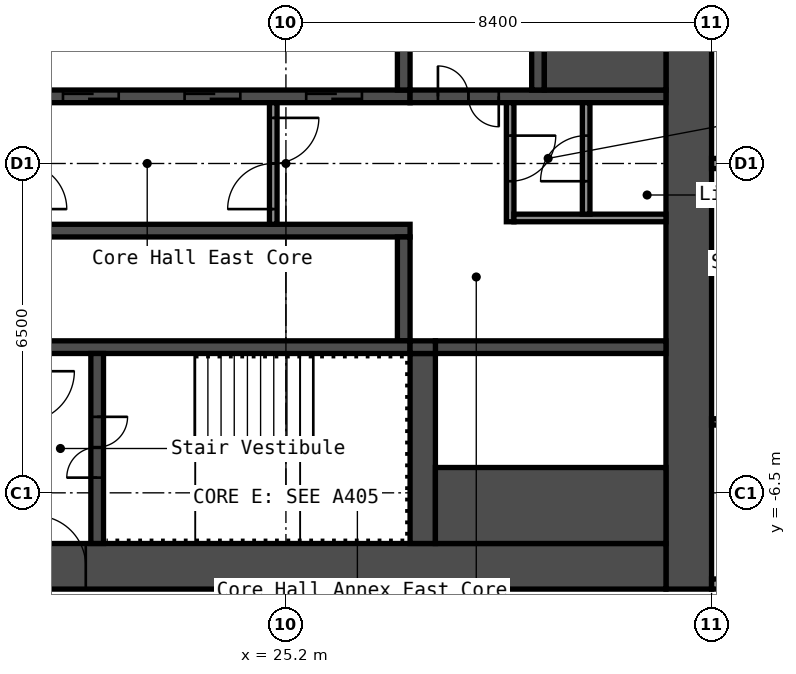
"""IFC4 building model, lengths in metres.
Left out: names, types, materials, properties, quantities, classifications, styles, units other than length and angle.
Written with IfcOpenShell. Run it as: python <this file> out.ifc"""

import sys

from ifc_helpers import new_model, si_unit, direction, frame, frame_2d, origin, place, context, subcontext, project, spatial, rectangle, extrude, element, fill, save


model = new_model("IFC4")
c1 = context("Model", 3, precision=1e-05, world=origin(), true_north=direction((0.0, 1.0)))
c2 = subcontext(c1, "Body", "Model", "MODEL_VIEW")
j1 = project(units=[si_unit("LENGTHUNIT", "METRE"), si_unit("PLANEANGLEUNIT", "RADIAN")], contexts=[c1])
p1 = place(None, origin())
s1 = spatial("IfcSite", under=j1, at=p1, CompositionType="ELEMENT")
p2 = place(p1, origin())
s2 = spatial("IfcBuilding", under=s1, at=p2, CompositionType="ELEMENT")
p3 = place(p2, frame((0.0, 0.0, 35.8)))
s3 = spatial("IfcBuildingStorey", under=s2, at=p3, CompositionType="ELEMENT", Elevation=35.8)
p4 = place(p3, frame((33.15, -8.4, 0.0), z_axis=(0.0, 0.0, 1.0), x_axis=(0.0, 1.0, 0.0)))
e1 = element("IfcWall", 1, at=p4, inside=s3, PredefinedType="SHEAR", context=c2, shape_type="SweptSolid", body=[
    extrude(rectangle(XDim=16.8, YDim=0.9, at=frame_2d((8.4, 0.0))), origin(), (0.0, 0.0, 1.0), 2.8),
])
p5 = place(p3, frame((17.7, -7.95, 0.0), z_axis=(0.0, 0.0, 1.0), x_axis=(1.0, 0.0, 0.0)))
e2 = element("IfcWall", 2, at=p5, inside=s3, PredefinedType="SHEAR", context=c2, shape_type="SweptSolid", body=[
    extrude(rectangle(XDim=15.0, YDim=0.9, at=frame_2d((7.5, 0.0))), origin(), (0.0, 0.0, 1.0), 2.8),
])
p6 = place(p5, frame((2.55, 0.0, 0.0)))
e3 = element("IfcOpeningElement", 3, at=p6, cuts=e2, PredefinedType="OPENING", context=c2, shape_type="SweptSolid", body=[
    extrude(rectangle(XDim=1.0, YDim=2.1, at=frame_2d((0.5, 1.05))), frame((0.0, 0.46, 0.0), z_axis=(0.0, -1.0, 0.0), x_axis=(1.0, 0.0, 0.0)), (0.0, 0.0, 1.0), 0.92),
])
p7 = place(p3, frame((20.15, 1.325, 0.0), z_axis=(0.0, 0.0, 1.0), x_axis=(1.0, 0.0, 0.0)))
e4 = element("IfcWall", 4, at=p7, inside=s3, PredefinedType="SHEAR", context=c2, shape_type="SweptSolid", body=[
    extrude(rectangle(XDim=7.5, YDim=0.25, at=frame_2d((3.75, 0.0))), origin(), (0.0, 0.0, 1.0), 2.8),
])
p8 = place(p7, frame((0.65, 0.0, 0.0)))
e5 = element("IfcOpeningElement", 5, at=p8, cuts=e4, PredefinedType="OPENING", context=c2, shape_type="SweptSolid", body=[
    extrude(rectangle(XDim=1.1, YDim=2.1, at=frame_2d((0.55, 1.05))), frame((0.0, 0.135, 0.0), z_axis=(0.0, -1.0, 0.0), x_axis=(1.0, 0.0, 0.0)), (0.0, 0.0, 1.0), 0.27),
])
p9 = place(p7, frame((3.05, 0.0, 0.0)))
e6 = element("IfcOpeningElement", 6, at=p9, cuts=e4, PredefinedType="OPENING", context=c2, shape_type="SweptSolid", body=[
    extrude(rectangle(XDim=1.1, YDim=2.1, at=frame_2d((0.55, 1.05))), frame((0.0, 0.135, 0.0), z_axis=(0.0, -1.0, 0.0), x_axis=(1.0, 0.0, 0.0)), (0.0, 0.0, 1.0), 0.27),
])
p10 = place(p7, frame((5.45, 0.0, 0.0)))
e7 = element("IfcOpeningElement", 7, at=p10, cuts=e4, PredefinedType="OPENING", context=c2, shape_type="SweptSolid", body=[
    extrude(rectangle(XDim=1.1, YDim=2.1, at=frame_2d((0.55, 1.05))), frame((0.0, 0.135, 0.0), z_axis=(0.0, -1.0, 0.0), x_axis=(1.0, 0.0, 0.0)), (0.0, 0.0, 1.0), 0.27),
])
p11 = place(p3, frame((27.525, 1.45, 0.0), z_axis=(0.0, 0.0, 1.0), x_axis=(0.0, 1.0, 0.0)))
e8 = element("IfcWall", 8, at=p11, inside=s3, PredefinedType="SHEAR", context=c2, shape_type="SweptSolid", body=[
    extrude(rectangle(XDim=2.05, YDim=0.25, at=frame_2d((1.025, 0.0))), origin(), (0.0, 0.0, 1.0), 2.8),
])
p12 = place(p3, frame((27.65, 1.325, 0.0), z_axis=(0.0, 0.0, 1.0), x_axis=(1.0, 0.0, 0.0)))
e9 = element("IfcWall", 9, at=p12, inside=s3, PredefinedType="SHEAR", context=c2, shape_type="SweptSolid", body=[
    extrude(rectangle(XDim=5.05, YDim=0.25, at=frame_2d((2.525, 0.0))), origin(), (0.0, 0.0, 1.0), 2.8),
])
p13 = place(p12, frame((0.55, 0.0, 0.0)))
e10 = element("IfcOpeningElement", 10, at=p13, cuts=e9, PredefinedType="OPENING", context=c2, shape_type="SweptSolid", body=[
    extrude(rectangle(XDim=1.2, YDim=2.1, at=frame_2d((0.6, 1.05))), frame((0.0, 0.135, 0.0), z_axis=(0.0, -1.0, 0.0), x_axis=(1.0, 0.0, 0.0)), (0.0, 0.0, 1.0), 0.27),
])
p14 = place(p3, frame((30.175, 1.45, 0.0), z_axis=(0.0, 0.0, 1.0), x_axis=(0.0, 1.0, 0.0)))
e11 = element("IfcWall", 11, at=p14, inside=s3, PredefinedType="SHEAR", context=c2, shape_type="SweptSolid", body=[
    extrude(rectangle(XDim=6.05, YDim=0.25, at=frame_2d((3.025, 0.0))), origin(), (0.0, 0.0, 1.0), 2.8),
])
p15 = place(p14, frame((2.625, 0.0, 0.0)))
e12 = element("IfcOpeningElement", 12, at=p15, cuts=e11, PredefinedType="OPENING", context=c2, shape_type="SweptSolid", body=[
    extrude(rectangle(XDim=1.1, YDim=2.1, at=frame_2d((0.55, 1.05))), frame((0.0, 0.135, 0.0), z_axis=(0.0, -1.0, 0.0), x_axis=(1.0, 0.0, 0.0)), (0.0, 0.0, 1.0), 0.27),
])
p16 = place(p3, frame((30.3, 2.375, 0.0), z_axis=(0.0, 0.0, 1.0), x_axis=(1.0, 0.0, 0.0)))
e13 = element("IfcWall", 13, at=p16, inside=s3, PredefinedType="SHEAR", context=c2, shape_type="SweptSolid", body=[
    extrude(rectangle(XDim=2.4, YDim=1.85, at=frame_2d((1.2, 0.0))), origin(), (0.0, 0.0, 1.0), 2.8),
])
p17 = place(p3, frame((20.15, -1.325, 0.0), z_axis=(0.0, 0.0, 1.0), x_axis=(1.0, 0.0, 0.0)))
e14 = element("IfcWall", 14, at=p17, inside=s3, PredefinedType="SHEAR", context=c2, shape_type="SweptSolid", body=[
    extrude(rectangle(XDim=7.5, YDim=0.25, at=frame_2d((3.75, 0.0))), origin(), (0.0, 0.0, 1.0), 2.8),
])
p18 = place(p3, frame((27.525, -3.5, 0.0), z_axis=(0.0, 0.0, 1.0), x_axis=(0.0, 1.0, 0.0)))
e15 = element("IfcWall", 15, at=p18, inside=s3, PredefinedType="SHEAR", context=c2, shape_type="SweptSolid", body=[
    extrude(rectangle(XDim=2.05, YDim=0.25, at=frame_2d((1.025, 0.0))), origin(), (0.0, 0.0, 1.0), 2.8),
])
p19 = place(p3, frame((20.15, -3.625, 0.0), z_axis=(0.0, 0.0, 1.0), x_axis=(1.0, 0.0, 0.0)))
e16 = element("IfcWall", 16, at=p19, inside=s3, PredefinedType="SHEAR", context=c2, shape_type="SweptSolid", body=[
    extrude(rectangle(XDim=7.5, YDim=0.25, at=frame_2d((3.75, 0.0))), origin(), (0.0, 0.0, 1.0), 2.8),
])
p20 = place(p3, frame((21.475, -7.5, 0.0), z_axis=(0.0, 0.0, 1.0), x_axis=(0.0, 1.0, 0.0)))
e17 = element("IfcWall", 17, at=p20, inside=s3, PredefinedType="SHEAR", context=c2, shape_type="SweptSolid", body=[
    extrude(rectangle(XDim=3.75, YDim=0.25, at=frame_2d((1.875, 0.0))), origin(), (0.0, 0.0, 1.0), 2.8),
])
p21 = place(p20, frame((1.3, 0.0, 0.0)))
e18 = element("IfcOpeningElement", 18, at=p21, cuts=e17, PredefinedType="OPENING", context=c2, shape_type="SweptSolid", body=[
    extrude(rectangle(XDim=1.2, YDim=2.1, at=frame_2d((0.6, 1.05))), frame((0.0, 0.135, 0.0), z_axis=(0.0, -1.0, 0.0), x_axis=(1.0, 0.0, 0.0)), (0.0, 0.0, 1.0), 0.27),
])
p22 = place(p3, frame((27.9, -7.5, 0.0), z_axis=(0.0, 0.0, 1.0), x_axis=(0.0, 1.0, 0.0)))
e19 = element("IfcWall", 19, at=p22, inside=s3, PredefinedType="SHEAR", context=c2, shape_type="SweptSolid", body=[
    extrude(rectangle(XDim=3.75, YDim=0.5, at=frame_2d((1.875, 0.0))), origin(), (0.0, 0.0, 1.0), 2.8),
])
p23 = place(p3, frame((28.15, -3.625, 0.0), z_axis=(0.0, 0.0, 1.0), x_axis=(1.0, 0.0, 0.0)))
e20 = element("IfcWall", 20, at=p23, inside=s3, PredefinedType="SHEAR", context=c2, shape_type="SweptSolid", body=[
    extrude(rectangle(XDim=4.55, YDim=0.25, at=frame_2d((2.275, 0.0))), origin(), (0.0, 0.0, 1.0), 2.8),
])
p24 = place(p3, frame((28.15, -6.75, 0.0), z_axis=(0.0, 0.0, 1.0), x_axis=(1.0, 0.0, 0.0)))
e21 = element("IfcWall", 21, at=p24, inside=s3, PredefinedType="SHEAR", context=c2, shape_type="SweptSolid", body=[
    extrude(rectangle(XDim=4.55, YDim=1.5, at=frame_2d((2.275, 0.0))), origin(), (0.0, 0.0, 1.0), 2.8),
])
p25 = place(p3, frame((27.65, -3.625, 0.0), z_axis=(0.0, 0.0, 1.0), x_axis=(1.0, 0.0, 0.0)))
e22 = element("IfcWall", 22, at=p25, inside=s3, PredefinedType="SHEAR", context=c2, shape_type="SweptSolid", body=[
    extrude(rectangle(XDim=0.5, YDim=0.25, at=frame_2d((0.25, 0.0))), origin(), (0.0, 0.0, 1.0), 2.8),
])
p26 = place(p3, frame((24.95, -1.2, 0.0), z_axis=(0.0, 0.0, 1.0), x_axis=(0.0, 1.0, 0.0)))
e23 = element("IfcWall", 23, at=p26, inside=s3, PredefinedType="PARTITIONING", context=c2, shape_type="SweptSolid", body=[
    extrude(rectangle(XDim=2.4, YDim=0.15, at=frame_2d((1.2, 0.0))), origin(), (0.0, 0.0, 1.0), 2.8),
])
p27 = place(p26, frame((0.3, 0.0, 0.0)))
e24 = element("IfcOpeningElement", 24, at=p27, cuts=e23, PredefinedType="OPENING", context=c2, shape_type="SweptSolid", body=[
    extrude(rectangle(XDim=1.8, YDim=2.1, at=frame_2d((0.9, 1.05))), frame((0.0, 0.085, 0.0), z_axis=(0.0, -1.0, 0.0), x_axis=(1.0, 0.0, 0.0)), (0.0, 0.0, 1.0), 0.17),
])
p28 = place(p3, frame((29.625, -1.15, 0.0), z_axis=(0.0, 0.0, 1.0), x_axis=(0.0, 1.0, 0.0)))
e25 = element("IfcWall", 25, at=p28, inside=s3, PredefinedType="PARTITIONING", context=c2, shape_type="SweptSolid", body=[
    extrude(rectangle(XDim=2.35, YDim=0.15, at=frame_2d((1.175, 0.0))), origin(), (0.0, 0.0, 1.0), 2.8),
])
p29 = place(p28, frame((0.8, 0.0, 0.0)))
e26 = element("IfcOpeningElement", 26, at=p29, cuts=e25, PredefinedType="OPENING", context=c2, shape_type="SweptSolid", body=[
    extrude(rectangle(XDim=0.9, YDim=2.1, at=frame_2d((0.45, 1.05))), frame((0.0, 0.085, 0.0), z_axis=(0.0, -1.0, 0.0), x_axis=(1.0, 0.0, 0.0)), (0.0, 0.0, 1.0), 0.17),
])
p30 = place(p3, frame((29.7, -1.075, 0.0), z_axis=(0.0, 0.0, 1.0), x_axis=(1.0, 0.0, 0.0)))
e27 = element("IfcWall", 27, at=p30, inside=s3, PredefinedType="PARTITIONING", context=c2, shape_type="SweptSolid", body=[
    extrude(rectangle(XDim=3.0, YDim=0.15, at=frame_2d((1.5, 0.0))), origin(), (0.0, 0.0, 1.0), 2.8),
])
p31 = place(p3, frame((31.125, -1.0, 0.0), z_axis=(0.0, 0.0, 1.0), x_axis=(0.0, 1.0, 0.0)))
e28 = element("IfcWall", 28, at=p31, inside=s3, PredefinedType="PARTITIONING", context=c2, shape_type="SweptSolid", body=[
    extrude(rectangle(XDim=2.2, YDim=0.15, at=frame_2d((1.1, 0.0))), origin(), (0.0, 0.0, 1.0), 2.8),
])
p32 = place(p31, frame((0.65, 0.0, 0.0)))
e29 = element("IfcOpeningElement", 29, at=p32, cuts=e28, PredefinedType="OPENING", context=c2, shape_type="SweptSolid", body=[
    extrude(rectangle(XDim=0.9, YDim=2.1, at=frame_2d((0.45, 1.05))), frame((0.0, 0.085, 0.0), z_axis=(0.0, -1.0, 0.0), x_axis=(1.0, 0.0, 0.0)), (0.0, 0.0, 1.0), 0.17),
])
p33 = place(p3, frame((33.6, -8.3, 0.0), z_axis=(0.0, 0.0, 1.0), x_axis=(1.0, 0.0, 0.0)))
e30 = element("IfcWall", 30, at=p33, inside=s3, PredefinedType="PARTITIONING", context=c2, shape_type="SweptSolid", body=[
    extrude(rectangle(XDim=15.0, YDim=0.2, at=frame_2d((7.5, 0.0))), origin(), (0.0, 0.0, 1.0), 2.8),
])
p34 = place(p33, frame((5.8, 0.0, 0.0)))
e31 = element("IfcOpeningElement", 31, at=p34, cuts=e30, PredefinedType="OPENING", context=c2, shape_type="SweptSolid", body=[
    extrude(rectangle(XDim=1.0, YDim=2.1, at=frame_2d((0.5, 1.05))), frame((0.0, 0.11, 0.0), z_axis=(0.0, -1.0, 0.0), x_axis=(1.0, 0.0, 0.0)), (0.0, 0.0, 1.0), 0.22),
])
p35 = place(p33, frame((9.5, 0.0, 0.0)))
e32 = element("IfcOpeningElement", 32, at=p35, cuts=e30, PredefinedType="OPENING", context=c2, shape_type="SweptSolid", body=[
    extrude(rectangle(XDim=1.0, YDim=2.1, at=frame_2d((0.5, 1.05))), frame((0.0, 0.11, 0.0), z_axis=(0.0, -1.0, 0.0), x_axis=(1.0, 0.0, 0.0)), (0.0, 0.0, 1.0), 0.22),
])
p36 = place(p3, frame((33.6, -5.1, 0.0), z_axis=(0.0, 0.0, 1.0), x_axis=(1.0, 0.0, 0.0)))
e33 = element("IfcWall", 33, at=p36, inside=s3, PredefinedType="PARTITIONING", context=c2, shape_type="SweptSolid", body=[
    extrude(rectangle(XDim=2.938, YDim=0.125, at=frame_2d((1.469, 0.0))), origin(), (0.0, 0.0, 1.0), 2.8),
])
p37 = place(p36, frame((1.1, 0.0, 0.0)))
e34 = element("IfcOpeningElement", 34, at=p37, cuts=e33, PredefinedType="OPENING", context=c2, shape_type="SweptSolid", body=[
    extrude(rectangle(XDim=0.8, YDim=2.1, at=frame_2d((0.4, 1.05))), frame((0.0, 0.073, 0.0), z_axis=(0.0, -1.0, 0.0), x_axis=(1.0, 0.0, 0.0)), (0.0, 0.0, 1.0), 0.145),
])
p38 = place(p3, frame((33.6, 0.0, 0.0), z_axis=(0.0, 0.0, 1.0), x_axis=(1.0, 0.0, 0.0)))
e35 = element("IfcWall", 35, at=p38, inside=s3, PredefinedType="PARTITIONING", context=c2, shape_type="SweptSolid", body=[
    extrude(rectangle(XDim=14.9, YDim=0.2, at=frame_2d((7.45, 0.0))), origin(), (0.0, 0.0, 1.0), 2.8),
])
p39 = place(p6, origin())
e36 = element("IfcDoor", 36, at=p39, inside=s3, OperationType="SINGLE_SWING_RIGHT", PredefinedType="DOOR", context=c2, shape_type="SweptSolid", body=[
    extrude(rectangle(XDim=1.0, YDim=2.1, at=frame_2d((0.5, 1.05))), frame((0.0, 0.025, 0.0), z_axis=(0.0, -1.0, 0.0), x_axis=(1.0, 0.0, 0.0)), (0.0, 0.0, 1.0), 0.05),
])
fill(e3, e36)
p40 = place(p21, origin())
e37 = element("IfcDoor", 37, at=p40, inside=s3, OperationType="DOUBLE_DOOR_SINGLE_SWING", PredefinedType="DOOR", context=c2, shape_type="SweptSolid", body=[
    extrude(rectangle(XDim=1.2, YDim=2.1, at=frame_2d((0.6, 1.05))), frame((0.0, 0.025, 0.0), z_axis=(0.0, -1.0, 0.0), x_axis=(1.0, 0.0, 0.0)), (0.0, 0.0, 1.0), 0.05),
])
fill(e18, e37)
p41 = place(p13, origin())
e38 = element("IfcDoor", 38, at=p41, inside=s3, OperationType="DOUBLE_DOOR_SINGLE_SWING", PredefinedType="DOOR", context=c2, shape_type="SweptSolid", body=[
    extrude(rectangle(XDim=1.2, YDim=2.1, at=frame_2d((0.6, 1.05))), frame((0.0, 0.025, 0.0), z_axis=(0.0, -1.0, 0.0), x_axis=(1.0, 0.0, 0.0)), (0.0, 0.0, 1.0), 0.05),
])
fill(e10, e38)
p42 = place(p27, origin())
e39 = element("IfcDoor", 39, at=p42, inside=s3, OperationType="DOUBLE_DOOR_SINGLE_SWING", PredefinedType="DOOR", context=c2, shape_type="SweptSolid", body=[
    extrude(rectangle(XDim=1.8, YDim=2.1, at=frame_2d((0.9, 1.05))), frame((0.0, 0.025, 0.0), z_axis=(0.0, -1.0, 0.0), x_axis=(1.0, 0.0, 0.0)), (0.0, 0.0, 1.0), 0.05),
])
fill(e24, e39)
p43 = place(p29, origin())
e40 = element("IfcDoor", 40, at=p43, inside=s3, OperationType="SINGLE_SWING_RIGHT", PredefinedType="DOOR", context=c2, shape_type="SweptSolid", body=[
    extrude(rectangle(XDim=0.9, YDim=2.1, at=frame_2d((0.45, 1.05))), frame((0.0, 0.025, 0.0), z_axis=(0.0, -1.0, 0.0), x_axis=(1.0, 0.0, 0.0)), (0.0, 0.0, 1.0), 0.05),
])
fill(e26, e40)
p44 = place(p32, origin())
e41 = element("IfcDoor", 41, at=p44, inside=s3, OperationType="SINGLE_SWING_RIGHT", PredefinedType="DOOR", context=c2, shape_type="SweptSolid", body=[
    extrude(rectangle(XDim=0.9, YDim=2.1, at=frame_2d((0.45, 1.05))), frame((0.0, 0.025, 0.0), z_axis=(0.0, -1.0, 0.0), x_axis=(1.0, 0.0, 0.0)), (0.0, 0.0, 1.0), 0.05),
])
fill(e29, e41)
p45 = place(p8, origin())
e42 = element("IfcDoor", 42, at=p45, inside=s3, OperationType="DOUBLE_DOOR_SLIDING", PredefinedType="DOOR", context=c2, shape_type="SweptSolid", body=[
    extrude(rectangle(XDim=1.1, YDim=2.1, at=frame_2d((0.55, 1.05))), frame((0.0, 0.025, 0.0), z_axis=(0.0, -1.0, 0.0), x_axis=(1.0, 0.0, 0.0)), (0.0, 0.0, 1.0), 0.05),
])
fill(e5, e42)
p46 = place(p9, origin())
e43 = element("IfcDoor", 43, at=p46, inside=s3, OperationType="DOUBLE_DOOR_SLIDING", PredefinedType="DOOR", context=c2, shape_type="SweptSolid", body=[
    extrude(rectangle(XDim=1.1, YDim=2.1, at=frame_2d((0.55, 1.05))), frame((0.0, 0.025, 0.0), z_axis=(0.0, -1.0, 0.0), x_axis=(1.0, 0.0, 0.0)), (0.0, 0.0, 1.0), 0.05),
])
fill(e6, e43)
p47 = place(p10, origin())
e44 = element("IfcDoor", 44, at=p47, inside=s3, OperationType="DOUBLE_DOOR_SLIDING", PredefinedType="DOOR", context=c2, shape_type="SweptSolid", body=[
    extrude(rectangle(XDim=1.1, YDim=2.1, at=frame_2d((0.55, 1.05))), frame((0.0, 0.025, 0.0), z_axis=(0.0, -1.0, 0.0), x_axis=(1.0, 0.0, 0.0)), (0.0, 0.0, 1.0), 0.05),
])
fill(e7, e44)
save(model, sys.argv[1])
